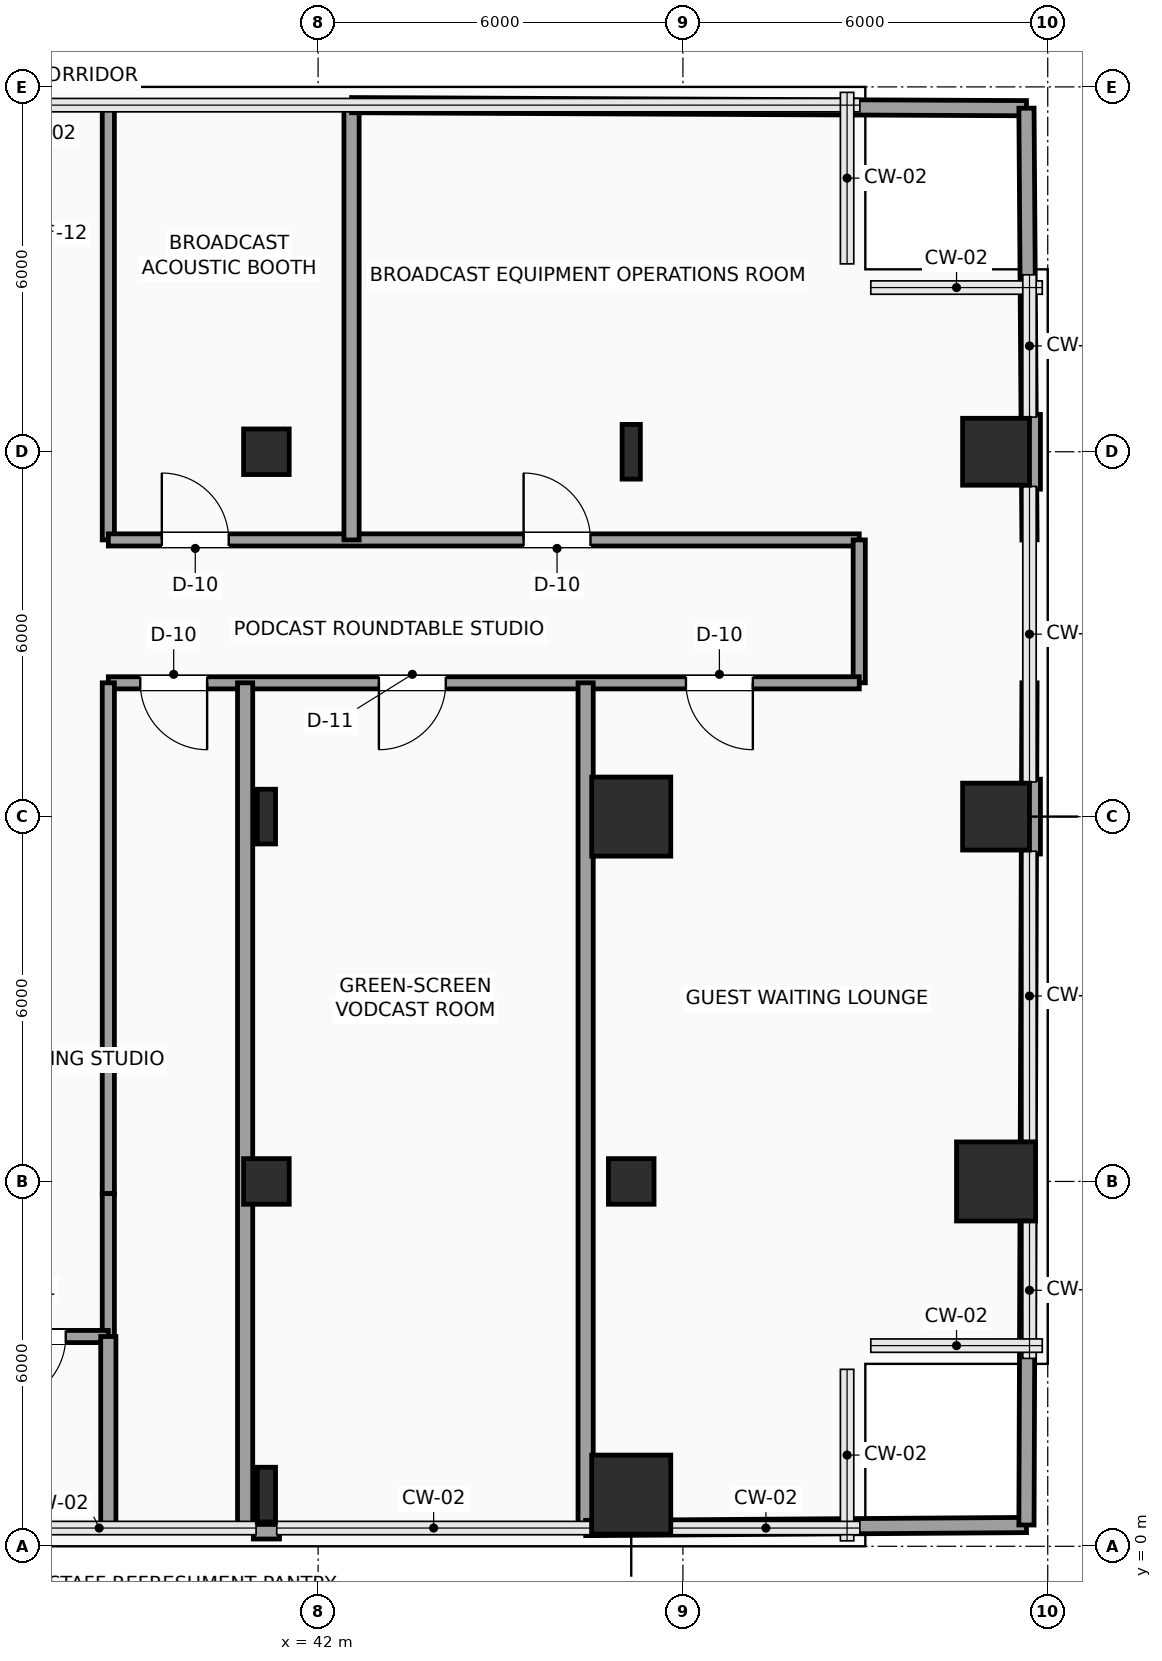
"""IFC4 building model, lengths in metres.
Left out: names, types, materials, properties, quantities, classifications, styles, units other than length and angle.
Written with IfcOpenShell. Run it as: python <this file> out.ifc"""

import sys

from ifc_helpers import new_model, si_unit, direction, frame, frame_2d, origin, origin_2d, place, context, subcontext, project, spatial, rectangle, hollow_rectangle, i_section, extrude, element, fill, save


model = new_model("IFC4")
c1 = context("Model", 3, precision=1e-05, world=origin(), true_north=direction((0.0, 1.0)))
c2 = subcontext(c1, "Body", "Model", "MODEL_VIEW")
j1 = project(units=[si_unit("LENGTHUNIT", "METRE"), si_unit("PLANEANGLEUNIT", "RADIAN")], contexts=[c1])
p1 = place(None, origin())
s1 = spatial("IfcSite", under=j1, at=p1, CompositionType="ELEMENT")
p2 = place(p1, origin())
s2 = spatial("IfcBuilding", under=s1, at=p2, CompositionType="ELEMENT")
p3 = place(p2, frame((0.0, 0.0, 83.1)))
s3 = spatial("IfcBuildingStorey", under=s2, at=p3, CompositionType="ELEMENT", Elevation=83.1)
p4 = place(p3, frame((41.15, 0.85, 0.0), z_axis=(0.0, 0.0, 1.0), x_axis=(1.0, 0.0, 0.0)))
e1 = element("IfcColumn", 1, at=p4, inside=s3, PredefinedType="COLUMN", context=c2, shape_type="SweptSolid", body=[
    extrude(i_section(OverallWidth=0.3, OverallDepth=0.9, WebThickness=0.019, FlangeThickness=0.035, FilletRadius=0.03, at=origin_2d()), origin(), (0.0, 0.0, 1.0), 3.9),
])
p5 = place(p3, frame((41.15, 6.0, 0.0), z_axis=(0.0, 0.0, 1.0), x_axis=(1.0, 0.0, 0.0)))
e2 = element("IfcColumn", 2, at=p5, inside=s3, PredefinedType="COLUMN", context=c2, shape_type="SweptSolid", body=[
    extrude(hollow_rectangle(XDim=0.75, YDim=0.75, WallThickness=0.035, InnerFilletRadius=0.035, OuterFilletRadius=0.05, at=origin_2d()), origin(), (0.0, 0.0, 1.0), 3.9),
])
p6 = place(p3, frame((41.15, 12.0, 0.0), z_axis=(0.0, 0.0, 1.0), x_axis=(1.0, 0.0, 0.0)))
e3 = element("IfcColumn", 3, at=p6, inside=s3, PredefinedType="COLUMN", context=c2, shape_type="SweptSolid", body=[
    extrude(i_section(OverallWidth=0.3, OverallDepth=0.9, WebThickness=0.019, FlangeThickness=0.035, FilletRadius=0.03, at=origin_2d()), origin(), (0.0, 0.0, 1.0), 3.9),
])
p7 = place(p3, frame((41.15, 18.0, 0.0), z_axis=(0.0, 0.0, 1.0), x_axis=(1.0, 0.0, 0.0)))
e4 = element("IfcColumn", 4, at=p7, inside=s3, PredefinedType="COLUMN", context=c2, shape_type="SweptSolid", body=[
    extrude(hollow_rectangle(XDim=0.75, YDim=0.75, WallThickness=0.035, InnerFilletRadius=0.035, OuterFilletRadius=0.05, at=origin_2d()), origin(), (0.0, 0.0, 1.0), 3.9),
])
p8 = place(p3, frame((47.15, 0.85, 0.0), z_axis=(0.0, 0.0, 1.0), x_axis=(1.0, 0.0, 0.0)))
e5 = element("IfcColumn", 5, at=p8, inside=s3, PredefinedType="COLUMN", context=c2, shape_type="SweptSolid", body=[
    extrude(rectangle(XDim=1.3, YDim=1.3, at=origin_2d()), origin(), (0.0, 0.0, 1.0), 3.9),
])
p9 = place(p3, frame((47.15, 6.0, 0.0), z_axis=(0.0, 0.0, 1.0), x_axis=(1.0, 0.0, 0.0)))
e6 = element("IfcColumn", 6, at=p9, inside=s3, PredefinedType="COLUMN", context=c2, shape_type="SweptSolid", body=[
    extrude(hollow_rectangle(XDim=0.75, YDim=0.75, WallThickness=0.035, InnerFilletRadius=0.035, OuterFilletRadius=0.05, at=origin_2d()), origin(), (0.0, 0.0, 1.0), 3.9),
])
p10 = place(p3, frame((47.15, 12.0, 0.0), z_axis=(0.0, 0.0, 1.0), x_axis=(1.0, 0.0, 0.0)))
e7 = element("IfcColumn", 7, at=p10, inside=s3, PredefinedType="COLUMN", context=c2, shape_type="SweptSolid", body=[
    extrude(rectangle(XDim=1.3, YDim=1.3, at=origin_2d()), origin(), (0.0, 0.0, 1.0), 3.9),
])
p11 = place(p3, frame((47.15, 18.0, 0.0), z_axis=(0.0, 0.0, 1.0), x_axis=(1.0, 0.0, 0.0)))
e8 = element("IfcColumn", 8, at=p11, inside=s3, PredefinedType="COLUMN", context=c2, shape_type="SweptSolid", body=[
    extrude(i_section(OverallWidth=0.3, OverallDepth=0.9, WebThickness=0.019, FlangeThickness=0.035, FilletRadius=0.03, at=origin_2d()), origin(), (0.0, 0.0, 1.0), 3.9),
])
p12 = place(p3, frame((53.15, 6.0, 0.0), z_axis=(0.0, 0.0, 1.0), x_axis=(1.0, 0.0, 0.0)))
e9 = element("IfcColumn", 9, at=p12, inside=s3, PredefinedType="COLUMN", context=c2, shape_type="SweptSolid", body=[
    extrude(rectangle(XDim=1.3, YDim=1.3, at=origin_2d()), origin(), (0.0, 0.0, 1.0), 3.9),
])
for number, where, z_axis, x_axis in (
    (10, (53.15, 12.0, 0.0), (0.0, 0.0, 1.0), (1.0, 0.0, 0.0)),
    (11, (53.15, 18.0, 0.0), (0.0, 0.0, 1.0), (1.0, 0.0, 0.0)),
):
    element("IfcColumn", number, at=place(p3, frame(where, z_axis=z_axis, x_axis=x_axis)), inside=s3, PredefinedType="COLUMN", context=c2, shape_type="SweptSolid", body=[
        extrude(rectangle(XDim=1.1, YDim=1.1, at=origin_2d()), origin(), (0.0, 0.0, 1.0), 3.9),
    ])
for number, where, z_axis, x_axis in (
    (12, (53.76, 18.615, 0.0), (0.0, 0.0, 1.0), (0.0, -1.0, 0.0)),
    (13, (53.76, 12.615, 0.0), (0.0, 0.0, 1.0), (0.0, -1.0, 0.0)),
):
    element("IfcWall", number, at=place(p3, frame(where, z_axis=z_axis, x_axis=x_axis)), inside=s3, PredefinedType="SOLIDWALL", context=c2, shape_type="SweptSolid", body=[
        extrude(rectangle(XDim=1.23, YDim=0.24, at=frame_2d((0.615, 0.0))), origin(), (0.0, 0.0, 1.0), 3.65),
    ])
p13 = place(p3, frame((41.365, 0.24, 0.0), z_axis=(0.0, 0.0, 1.0), x_axis=(-1.0, 0.0, 0.0)))
e14 = element("IfcWall", 14, at=p13, inside=s3, PredefinedType="SOLIDWALL", context=c2, shape_type="SweptSolid", body=[
    extrude(rectangle(XDim=0.43, YDim=0.24, at=frame_2d((0.215, 0.0))), origin(), (0.0, 0.0, 1.0), 3.65),
])
p14 = place(p3, frame((38.55, 23.7, 0.0), z_axis=(0.0, 0.0, 1.0), x_axis=(0.0, -1.0, 0.0)))
e15 = element("IfcWall", 15, at=p14, inside=s3, PredefinedType="PARTITIONING", context=c2, shape_type="SweptSolid", body=[
    extrude(rectangle(XDim=7.15, YDim=0.2, at=frame_2d((3.575, 0.0))), origin(), (0.0, 0.0, 1.0), 3.65),
])
p15 = place(p3, frame((38.55, 16.55, 0.0), z_axis=(0.0, 0.0, 1.0), x_axis=(1.0, 0.0, 0.0)))
e16 = element("IfcWall", 16, at=p15, inside=s3, PredefinedType="PARTITIONING", context=c2, shape_type="SweptSolid", body=[
    extrude(rectangle(XDim=12.35, YDim=0.2, at=frame_2d((6.175, 0.0))), origin(), (0.0, 0.0, 1.0), 3.65),
])
p16 = place(p15, frame((0.88, 0.0, 0.0)))
e17 = element("IfcOpeningElement", 17, at=p16, cuts=e16, PredefinedType="OPENING", context=c2, shape_type="SweptSolid", body=[
    extrude(rectangle(XDim=1.1, YDim=2.25, at=frame_2d((0.55, 1.125))), frame((0.0, 0.11, 0.0), z_axis=(0.0, -1.0, 0.0), x_axis=(1.0, 0.0, 0.0)), (0.0, 0.0, 1.0), 0.22),
])
p17 = place(p15, frame((6.83, 0.0, 0.0)))
e18 = element("IfcOpeningElement", 18, at=p17, cuts=e16, PredefinedType="OPENING", context=c2, shape_type="SweptSolid", body=[
    extrude(rectangle(XDim=1.1, YDim=2.25, at=frame_2d((0.55, 1.125))), frame((0.0, 0.11, 0.0), z_axis=(0.0, -1.0, 0.0), x_axis=(1.0, 0.0, 0.0)), (0.0, 0.0, 1.0), 0.22),
])
p18 = place(p3, frame((50.9, 16.55, 0.0), z_axis=(0.0, 0.0, 1.0), x_axis=(0.0, -1.0, 0.0)))
e19 = element("IfcWall", 19, at=p18, inside=s3, PredefinedType="PARTITIONING", context=c2, shape_type="SweptSolid", body=[
    extrude(rectangle(XDim=2.35, YDim=0.2, at=frame_2d((1.175, 0.0))), origin(), (0.0, 0.0, 1.0), 3.65),
])
p19 = place(p3, frame((50.9, 14.2, 0.0), z_axis=(0.0, 0.0, 1.0), x_axis=(-1.0, 0.0, 0.0)))
e20 = element("IfcWall", 20, at=p19, inside=s3, PredefinedType="PARTITIONING", context=c2, shape_type="SweptSolid", body=[
    extrude(rectangle(XDim=12.35, YDim=0.2, at=frame_2d((6.175, 0.0))), origin(), (0.0, 0.0, 1.0), 3.65),
])
p20 = place(p19, frame((10.725, 0.0, 0.0)))
e21 = element("IfcOpeningElement", 21, at=p20, cuts=e20, PredefinedType="OPENING", context=c2, shape_type="SweptSolid", body=[
    extrude(rectangle(XDim=1.1, YDim=2.25, at=frame_2d((0.55, 1.125))), frame((0.0, 0.11, 0.0), z_axis=(0.0, -1.0, 0.0), x_axis=(1.0, 0.0, 0.0)), (0.0, 0.0, 1.0), 0.22),
])
p21 = place(p19, frame((6.8, 0.0, 0.0)))
e22 = element("IfcOpeningElement", 22, at=p21, cuts=e20, PredefinedType="OPENING", context=c2, shape_type="SweptSolid", body=[
    extrude(rectangle(XDim=1.1, YDim=2.25, at=frame_2d((0.55, 1.125))), frame((0.0, 0.11, 0.0), z_axis=(0.0, -1.0, 0.0), x_axis=(1.0, 0.0, 0.0)), (0.0, 0.0, 1.0), 0.22),
])
p22 = place(p19, frame((1.75, 0.0, 0.0)))
e23 = element("IfcOpeningElement", 23, at=p22, cuts=e20, PredefinedType="OPENING", context=c2, shape_type="SweptSolid", body=[
    extrude(rectangle(XDim=1.1, YDim=2.25, at=frame_2d((0.55, 1.125))), frame((0.0, 0.11, 0.0), z_axis=(0.0, -1.0, 0.0), x_axis=(1.0, 0.0, 0.0)), (0.0, 0.0, 1.0), 0.22),
])
p23 = place(p3, frame((38.55, 14.2, 0.0), z_axis=(0.0, 0.0, 1.0), x_axis=(0.0, -1.0, 0.0)))
e24 = element("IfcWall", 24, at=p23, inside=s3, PredefinedType="PARTITIONING", context=c2, shape_type="SweptSolid", body=[
    extrude(rectangle(XDim=8.4, YDim=0.2, at=frame_2d((4.2, 0.0))), origin(), (0.0, 0.0, 1.0), 3.65),
])
p24 = place(p3, frame((38.55, 5.8, 0.0), z_axis=(0.0, 0.0, 1.0), x_axis=(0.0, -1.0, 0.0)))
e25 = element("IfcWall", 25, at=p24, inside=s3, PredefinedType="PARTITIONING", context=c2, shape_type="SweptSolid", body=[
    extrude(rectangle(XDim=2.35, YDim=0.2, at=frame_2d((1.175, 0.0))), origin(), (0.0, 0.0, 1.0), 3.65),
])
p25 = place(p3, frame((38.55, 3.45, 0.0), z_axis=(0.0, 0.0, 1.0), x_axis=(-1.0, 0.0, 0.0)))
e26 = element("IfcWall", 26, at=p25, inside=s3, PredefinedType="PARTITIONING", context=c2, shape_type="SweptSolid", body=[
    extrude(rectangle(XDim=2.4, YDim=0.2, at=frame_2d((1.2, 0.0))), origin(), (0.0, 0.0, 1.0), 3.142),
])
p26 = place(p25, frame((0.7, 0.0, 0.0)))
e27 = element("IfcOpeningElement", 27, at=p26, cuts=e26, PredefinedType="OPENING", context=c2, shape_type="SweptSolid", body=[
    extrude(rectangle(XDim=1.1, YDim=2.25, at=frame_2d((0.55, 1.125))), frame((0.0, 0.11, 0.0), z_axis=(0.0, -1.0, 0.0), x_axis=(1.0, 0.0, 0.0)), (0.0, 0.0, 1.0), 0.22),
])
p27 = place(p3, frame((40.8, 0.3, 0.0), z_axis=(0.0, 0.0, 1.0), x_axis=(0.0, 1.0, 0.0)))
e28 = element("IfcWall", 28, at=p27, inside=s3, PredefinedType="PARTITIONING", context=c2, shape_type="SweptSolid", body=[
    extrude(rectangle(XDim=13.9, YDim=0.25, at=frame_2d((6.95, 0.0))), origin(), (0.0, 0.0, 1.0), 2.992),
])
p28 = place(p3, frame((46.4, 0.3, 0.0), z_axis=(0.0, 0.0, 1.0), x_axis=(0.0, 1.0, 0.0)))
e29 = element("IfcWall", 29, at=p28, inside=s3, PredefinedType="PARTITIONING", context=c2, shape_type="SweptSolid", body=[
    extrude(rectangle(XDim=13.9, YDim=0.25, at=frame_2d((6.95, 0.0))), origin(), (0.0, 0.0, 1.0), 3.65),
])
p29 = place(p3, frame((46.4, 0.3, 0.0), z_axis=(0.0, 0.0, 1.0), x_axis=(0.999976173168, 0.006903122154, 0.0)))
e30 = element("IfcWall", 30, at=p29, inside=s3, PredefinedType="PARTITIONING", context=c2, shape_type="SweptSolid", body=[
    extrude(rectangle(XDim=7.25, YDim=0.25, at=frame_2d((3.625, 0.0))), origin(), (0.0, 0.0, 1.0), 3.65),
])
p30 = place(p3, frame((53.65, 0.35, 0.0), z_axis=(0.0, 0.0, 1.0), x_axis=(0.003606251025, 0.999993497456, 0.0)))
e31 = element("IfcWall", 31, at=p30, inside=s3, PredefinedType="PARTITIONING", context=c2, shape_type="SweptSolid", body=[
    extrude(rectangle(XDim=11.035, YDim=0.25, at=frame_2d((5.518, 0.0))), origin(), (0.0, 0.0, 1.0), 3.65),
])
p31 = place(p3, frame((53.694, 12.615, 0.0), z_axis=(0.0, 0.0, 1.0), x_axis=(0.003542799701, 0.999993724265, 0.0)))
e32 = element("IfcWall", 32, at=p31, inside=s3, PredefinedType="PARTITIONING", context=c2, shape_type="SweptSolid", body=[
    extrude(rectangle(XDim=1.585, YDim=0.25, at=frame_2d((0.792, 0.0))), origin(), (0.0, 0.0, 1.0), 3.65),
])
p32 = place(p3, frame((42.55, 16.55, 0.0), z_axis=(0.0, 0.0, 1.0), x_axis=(0.0, 1.0, 0.0)))
e33 = element("IfcWall", 33, at=p32, inside=s3, PredefinedType="PARTITIONING", context=c2, shape_type="SweptSolid", body=[
    extrude(rectangle(XDim=7.15, YDim=0.25, at=frame_2d((3.575, 0.0))), origin(), (0.0, 0.0, 1.0), 3.65),
])
p33 = place(p3, frame((42.55, 23.7, 0.0), z_axis=(0.0, 0.0, 1.0), x_axis=(0.999989834782, -0.004508917104, 0.0)))
e34 = element("IfcWall", 34, at=p33, inside=s3, PredefinedType="PARTITIONING", context=c2, shape_type="SweptSolid", body=[
    extrude(rectangle(XDim=11.1, YDim=0.25, at=frame_2d((5.55, 0.0))), origin(), (0.0, 0.0, 1.0), 3.65),
])
p34 = place(p3, frame((53.7, 16.55, 0.0), z_axis=(0.0, 0.0, 1.0), x_axis=(-0.007017371073, 0.999975377948, 0.0)))
e35 = element("IfcWall", 35, at=p34, inside=s3, PredefinedType="PARTITIONING", context=c2, shape_type="SweptSolid", body=[
    extrude(rectangle(XDim=0.835, YDim=0.25, at=frame_2d((0.417, 0.0))), origin(), (0.0, 0.0, 1.0), 3.65),
])
p35 = place(p3, frame((53.686, 18.615, 0.0), z_axis=(0.0, 0.0, 1.0), x_axis=(-0.007079296972, 0.999974941463, 0.0)))
e36 = element("IfcWall", 36, at=p35, inside=s3, PredefinedType="PARTITIONING", context=c2, shape_type="SweptSolid", body=[
    extrude(rectangle(XDim=5.035, YDim=0.25, at=frame_2d((2.518, 0.0))), origin(), (0.0, 0.0, 1.0), 3.65),
])
p36 = place(p3, frame((38.55, 0.3, 0.0), z_axis=(0.0, 0.0, 1.0), x_axis=(0.0, 1.0, 0.0)))
e37 = element("IfcWall", 37, at=p36, inside=s3, PredefinedType="PARTITIONING", context=c2, shape_type="SweptSolid", body=[
    extrude(rectangle(XDim=3.15, YDim=0.25, at=frame_2d((1.575, 0.0))), origin(), (0.0, 0.0, 1.0), 3.65),
])
p37 = place(p16, origin())
e38 = element("IfcDoor", 38, at=p37, inside=s3, OperationType="SINGLE_SWING_LEFT", PredefinedType="DOOR", context=c2, shape_type="SweptSolid", body=[
    extrude(rectangle(XDim=1.1, YDim=2.25, at=frame_2d((0.55, 1.125))), frame((0.0, 0.025, 0.0), z_axis=(0.0, -1.0, 0.0), x_axis=(1.0, 0.0, 0.0)), (0.0, 0.0, 1.0), 0.05),
])
fill(e17, e38)
p38 = place(p17, origin())
e39 = element("IfcDoor", 39, at=p38, inside=s3, OperationType="SINGLE_SWING_LEFT", PredefinedType="DOOR", context=c2, shape_type="SweptSolid", body=[
    extrude(rectangle(XDim=1.1, YDim=2.25, at=frame_2d((0.55, 1.125))), frame((0.0, 0.025, 0.0), z_axis=(0.0, -1.0, 0.0), x_axis=(1.0, 0.0, 0.0)), (0.0, 0.0, 1.0), 0.05),
])
fill(e18, e39)
p39 = place(p20, origin())
e40 = element("IfcDoor", 40, at=p39, inside=s3, OperationType="SINGLE_SWING_LEFT", PredefinedType="DOOR", context=c2, shape_type="SweptSolid", body=[
    extrude(rectangle(XDim=1.1, YDim=2.25, at=frame_2d((0.55, 1.125))), frame((0.0, 0.025, 0.0), z_axis=(0.0, -1.0, 0.0), x_axis=(1.0, 0.0, 0.0)), (0.0, 0.0, 1.0), 0.05),
])
fill(e21, e40)
p40 = place(p21, origin())
e41 = element("IfcDoor", 41, at=p40, inside=s3, OperationType="SINGLE_SWING_RIGHT", PredefinedType="DOOR", context=c2, shape_type="SweptSolid", body=[
    extrude(rectangle(XDim=1.1, YDim=2.25, at=frame_2d((0.55, 1.125))), frame((0.0, 0.025, 0.0), z_axis=(0.0, -1.0, 0.0), x_axis=(1.0, 0.0, 0.0)), (0.0, 0.0, 1.0), 0.05),
])
fill(e22, e41)
p41 = place(p22, origin())
e42 = element("IfcDoor", 42, at=p41, inside=s3, OperationType="SINGLE_SWING_LEFT", PredefinedType="DOOR", context=c2, shape_type="SweptSolid", body=[
    extrude(rectangle(XDim=1.1, YDim=2.25, at=frame_2d((0.55, 1.125))), frame((0.0, 0.025, 0.0), z_axis=(0.0, -1.0, 0.0), x_axis=(1.0, 0.0, 0.0)), (0.0, 0.0, 1.0), 0.05),
])
fill(e23, e42)
p42 = place(p26, origin())
e43 = element("IfcDoor", 43, at=p42, inside=s3, OperationType="SINGLE_SWING_RIGHT", PredefinedType="DOOR", context=c2, shape_type="SweptSolid", body=[
    extrude(rectangle(XDim=1.1, YDim=2.25, at=frame_2d((0.55, 1.125))), frame((0.0, 0.025, 0.0), z_axis=(0.0, -1.0, 0.0), x_axis=(1.0, 0.0, 0.0)), (0.0, 0.0, 1.0), 0.05),
])
fill(e27, e43)
save(model, sys.argv[1])
